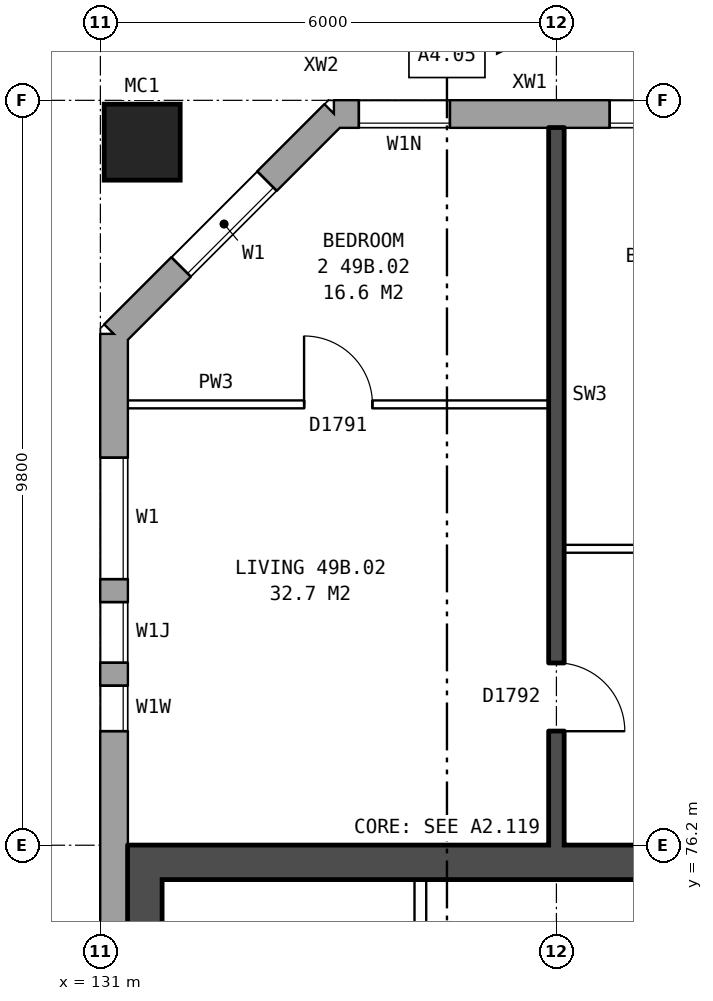
"""IFC4 building model, lengths in metres.
Left out: names, types, materials, properties, quantities, classifications, styles, units other than length and angle.
Written with IfcOpenShell. Run it as: python <this file> out.ifc"""

import sys

from ifc_helpers import new_model, si_unit, direction, frame, frame_2d, origin, origin_2d, place, context, subcontext, project, spatial, rectangle, hollow_rectangle, extrude, element, fill, save


model = new_model("IFC4")
c1 = context("Model", 3, precision=1e-05, world=origin(), true_north=direction((0.0, 1.0)))
c2 = subcontext(c1, "Body", "Model", "MODEL_VIEW")
j1 = project(units=[si_unit("LENGTHUNIT", "METRE"), si_unit("PLANEANGLEUNIT", "RADIAN")], contexts=[c1])
p1 = place(None, origin())
s1 = spatial("IfcSite", under=j1, at=p1, CompositionType="ELEMENT")
p2 = place(p1, origin())
s2 = spatial("IfcBuilding", under=s1, at=p2, CompositionType="ELEMENT")
p3 = place(p2, frame((0.0, 0.0, 175.8)))
s3 = spatial("IfcBuildingStorey", under=s2, at=p3, CompositionType="ELEMENT", Elevation=175.8)
p4 = place(p3, frame((131.55, 85.45, 0.0), z_axis=(0.0, 0.0, 1.0), x_axis=(1.0, 0.0, 0.0)))
e1 = element("IfcColumn", 1, at=p4, inside=s3, PredefinedType="COLUMN", context=c2, shape_type="SweptSolid", body=[
    extrude(hollow_rectangle(XDim=1.0, YDim=1.0, WallThickness=0.055, at=origin_2d()), origin(), (0.0, 0.0, 1.0), 3.1),
])
p5 = place(p3, frame((167.175, 85.82, 0.0), z_axis=(0.0, 0.0, 1.0), x_axis=(-1.0, 0.0, 0.0)))
e2 = element("IfcWall", 2, at=p5, inside=s3, PredefinedType="STANDARD", context=c2, shape_type="SweptSolid", body=[
    extrude(rectangle(XDim=33.101, YDim=0.36, at=frame_2d((16.55, 0.0))), origin(), (0.0, 0.0, 1.0), 2.85),
])
p6 = place(p5, frame((0.3, 0.0, 0.8)))
e3 = element("IfcOpeningElement", 3, at=p6, cuts=e2, PredefinedType="OPENING", context=c2, shape_type="SweptSolid", body=[
    extrude(rectangle(XDim=0.6, YDim=1.8, at=frame_2d((0.3, 0.9))), frame((0.0, 0.19, 0.0), z_axis=(0.0, -1.0, 0.0), x_axis=(1.0, 0.0, 0.0)), (0.0, 0.0, 1.0), 0.38),
])
p7 = place(p5, frame((3.875, 0.0, 0.8)))
e4 = element("IfcOpeningElement", 4, at=p7, cuts=e2, PredefinedType="OPENING", context=c2, shape_type="SweptSolid", body=[
    extrude(rectangle(XDim=1.6, YDim=1.8, at=frame_2d((0.8, 0.9))), frame((0.0, 0.19, 0.0), z_axis=(0.0, -1.0, 0.0), x_axis=(1.0, 0.0, 0.0)), (0.0, 0.0, 1.0), 0.38),
])
p8 = place(p5, frame((6.875, 0.0, 0.8)))
e5 = element("IfcOpeningElement", 5, at=p8, cuts=e2, PredefinedType="OPENING", context=c2, shape_type="SweptSolid", body=[
    extrude(rectangle(XDim=1.6, YDim=1.8, at=frame_2d((0.8, 0.9))), frame((0.0, 0.19, 0.0), z_axis=(0.0, -1.0, 0.0), x_axis=(1.0, 0.0, 0.0)), (0.0, 0.0, 1.0), 0.38),
])
p9 = place(p5, frame((9.875, 0.0, 0.8)))
e6 = element("IfcOpeningElement", 6, at=p9, cuts=e2, PredefinedType="OPENING", context=c2, shape_type="SweptSolid", body=[
    extrude(rectangle(XDim=1.6, YDim=1.8, at=frame_2d((0.8, 0.9))), frame((0.0, 0.19, 0.0), z_axis=(0.0, -1.0, 0.0), x_axis=(1.0, 0.0, 0.0)), (0.0, 0.0, 1.0), 0.38),
])
p10 = place(p5, frame((12.875, 0.0, 0.8)))
e7 = element("IfcOpeningElement", 7, at=p10, cuts=e2, PredefinedType="OPENING", context=c2, shape_type="SweptSolid", body=[
    extrude(rectangle(XDim=1.6, YDim=1.8, at=frame_2d((0.8, 0.9))), frame((0.0, 0.19, 0.0), z_axis=(0.0, -1.0, 0.0), x_axis=(1.0, 0.0, 0.0)), (0.0, 0.0, 1.0), 0.38),
])
p11 = place(p5, frame((15.875, 0.0, 0.8)))
e8 = element("IfcOpeningElement", 8, at=p11, cuts=e2, PredefinedType="OPENING", context=c2, shape_type="SweptSolid", body=[
    extrude(rectangle(XDim=1.6, YDim=1.8, at=frame_2d((0.8, 0.9))), frame((0.0, 0.19, 0.0), z_axis=(0.0, -1.0, 0.0), x_axis=(1.0, 0.0, 0.0)), (0.0, 0.0, 1.0), 0.38),
])
p12 = place(p5, frame((18.875, 0.0, 0.8)))
e9 = element("IfcOpeningElement", 9, at=p12, cuts=e2, PredefinedType="OPENING", context=c2, shape_type="SweptSolid", body=[
    extrude(rectangle(XDim=1.6, YDim=1.8, at=frame_2d((0.8, 0.9))), frame((0.0, 0.19, 0.0), z_axis=(0.0, -1.0, 0.0), x_axis=(1.0, 0.0, 0.0)), (0.0, 0.0, 1.0), 0.38),
])
p13 = place(p5, frame((21.875, 0.0, 0.8)))
e10 = element("IfcOpeningElement", 10, at=p13, cuts=e2, PredefinedType="OPENING", context=c2, shape_type="SweptSolid", body=[
    extrude(rectangle(XDim=1.6, YDim=1.8, at=frame_2d((0.8, 0.9))), frame((0.0, 0.19, 0.0), z_axis=(0.0, -1.0, 0.0), x_axis=(1.0, 0.0, 0.0)), (0.0, 0.0, 1.0), 0.38),
])
p14 = place(p5, frame((24.875, 0.0, 0.8)))
e11 = element("IfcOpeningElement", 11, at=p14, cuts=e2, PredefinedType="OPENING", context=c2, shape_type="SweptSolid", body=[
    extrude(rectangle(XDim=1.6, YDim=1.8, at=frame_2d((0.8, 0.9))), frame((0.0, 0.19, 0.0), z_axis=(0.0, -1.0, 0.0), x_axis=(1.0, 0.0, 0.0)), (0.0, 0.0, 1.0), 0.38),
])
p15 = place(p5, frame((27.875, 0.0, 0.8)))
e12 = element("IfcOpeningElement", 12, at=p15, cuts=e2, PredefinedType="OPENING", context=c2, shape_type="SweptSolid", body=[
    extrude(rectangle(XDim=1.6, YDim=1.8, at=frame_2d((0.8, 0.9))), frame((0.0, 0.19, 0.0), z_axis=(0.0, -1.0, 0.0), x_axis=(1.0, 0.0, 0.0)), (0.0, 0.0, 1.0), 0.38),
])
p16 = place(p5, frame((31.575, 0.0, 1.4)))
e13 = element("IfcOpeningElement", 13, at=p16, cuts=e2, PredefinedType="OPENING", context=c2, shape_type="SweptSolid", body=[
    extrude(rectangle(XDim=1.2, YDim=1.2, at=frame_2d((0.6, 0.6))), frame((0.0, 0.19, 0.0), z_axis=(0.0, -1.0, 0.0), x_axis=(1.0, 0.0, 0.0)), (0.0, 0.0, 1.0), 0.38),
])
p17 = place(p5, frame((1.2, 0.0, 1.7)))
e14 = element("IfcOpeningElement", 14, at=p17, cuts=e2, PredefinedType="OPENING", context=c2, shape_type="SweptSolid", body=[
    extrude(rectangle(XDim=0.6, YDim=0.9, at=frame_2d((0.3, 0.45))), frame((0.0, 0.19, 0.0), z_axis=(0.0, -1.0, 0.0), x_axis=(1.0, 0.0, 0.0)), (0.0, 0.0, 1.0), 0.38),
])
p18 = place(p5, frame((2.8, 0.0, 0.8)))
e15 = element("IfcOpeningElement", 15, at=p18, cuts=e2, PredefinedType="OPENING", context=c2, shape_type="SweptSolid", body=[
    extrude(rectangle(XDim=0.6, YDim=0.9, at=frame_2d((0.3, 0.45))), frame((0.0, 0.19, 0.0), z_axis=(0.0, -1.0, 0.0), x_axis=(1.0, 0.0, 0.0)), (0.0, 0.0, 1.0), 0.38),
])
p19 = place(p3, frame((134.075, 85.82, 0.0), z_axis=(0.0, 0.0, 1.0), x_axis=(-0.707106781187, -0.707106781187, 0.0)))
e16 = element("IfcWall", 16, at=p19, inside=s3, PredefinedType="STANDARD", context=c2, shape_type="SweptSolid", body=[
    extrude(rectangle(XDim=4.094, YDim=0.36, at=frame_2d((2.047, 0.0))), origin(), (0.0, 0.0, 1.0), 2.85),
])
p20 = place(p19, frame((1.247, 0.0, 0.8)))
e17 = element("IfcOpeningElement", 17, at=p20, cuts=e16, PredefinedType="OPENING", context=c2, shape_type="SweptSolid", body=[
    extrude(rectangle(XDim=1.6, YDim=1.8, at=frame_2d((0.8, 0.9))), frame((0.0, 0.19, 0.0), z_axis=(0.0, -1.0, 0.0), x_axis=(1.0, 0.0, 0.0)), (0.0, 0.0, 1.0), 0.38),
])
p21 = place(p3, frame((131.18, 82.925, 0.0), z_axis=(0.0, 0.0, 1.0), x_axis=(0.0, -1.0, 0.0)))
e18 = element("IfcWall", 18, at=p21, inside=s3, PredefinedType="STANDARD", context=c2, shape_type="SweptSolid", body=[
    extrude(rectangle(XDim=25.851, YDim=0.36, at=frame_2d((12.925, 0.0))), origin(), (0.0, 0.0, 1.0), 2.85),
])
p22 = place(p21, frame((1.625, 0.0, 0.8)))
e19 = element("IfcOpeningElement", 19, at=p22, cuts=e18, PredefinedType="OPENING", context=c2, shape_type="SweptSolid", body=[
    extrude(rectangle(XDim=1.6, YDim=1.8, at=frame_2d((0.8, 0.9))), frame((0.0, 0.19, 0.0), z_axis=(0.0, -1.0, 0.0), x_axis=(1.0, 0.0, 0.0)), (0.0, 0.0, 1.0), 0.38),
])
p23 = place(p21, frame((3.525, 0.0, 1.1)))
e20 = element("IfcOpeningElement", 20, at=p23, cuts=e18, PredefinedType="OPENING", context=c2, shape_type="SweptSolid", body=[
    extrude(rectangle(XDim=0.8, YDim=1.5, at=frame_2d((0.4, 0.75))), frame((0.0, 0.19, 0.0), z_axis=(0.0, -1.0, 0.0), x_axis=(1.0, 0.0, 0.0)), (0.0, 0.0, 1.0), 0.38),
])
p24 = place(p21, frame((19.45, 0.0, 0.35)))
e21 = element("IfcOpeningElement", 21, at=p24, cuts=e18, PredefinedType="OPENING", context=c2, shape_type="SweptSolid", body=[
    extrude(rectangle(XDim=0.8, YDim=0.9, at=frame_2d((0.4, 0.45))), frame((0.0, 0.19, 0.0), z_axis=(0.0, -1.0, 0.0), x_axis=(1.0, 0.0, 0.0)), (0.0, 0.0, 1.0), 0.38),
])
p25 = place(p21, frame((22.625, 0.0, 0.8)))
e22 = element("IfcOpeningElement", 22, at=p25, cuts=e18, PredefinedType="OPENING", context=c2, shape_type="SweptSolid", body=[
    extrude(rectangle(XDim=1.6, YDim=1.8, at=frame_2d((0.8, 0.9))), frame((0.0, 0.19, 0.0), z_axis=(0.0, -1.0, 0.0), x_axis=(1.0, 0.0, 0.0)), (0.0, 0.0, 1.0), 0.38),
])
p26 = place(p21, frame((4.625, 0.0, 1.7)))
e23 = element("IfcOpeningElement", 23, at=p26, cuts=e18, PredefinedType="OPENING", context=c2, shape_type="SweptSolid", body=[
    extrude(rectangle(XDim=0.6, YDim=0.9, at=frame_2d((0.3, 0.45))), frame((0.0, 0.19, 0.0), z_axis=(0.0, -1.0, 0.0), x_axis=(1.0, 0.0, 0.0)), (0.0, 0.0, 1.0), 0.38),
])
p27 = place(p21, frame((20.6, 0.0, 1.65)))
e24 = element("IfcOpeningElement", 24, at=p27, cuts=e18, PredefinedType="OPENING", context=c2, shape_type="SweptSolid", body=[
    extrude(rectangle(XDim=1.0, YDim=0.9, at=frame_2d((0.5, 0.45))), frame((0.0, 0.19, 0.0), z_axis=(0.0, -1.0, 0.0), x_axis=(1.0, 0.0, 0.0)), (0.0, 0.0, 1.0), 0.38),
])
p28 = place(p3, frame((131.585, 63.8, 0.0), z_axis=(0.0, 0.0, 1.0), x_axis=(0.0, 1.0, 0.0)))
e25 = element("IfcWall", 25, at=p28, inside=s3, PredefinedType="SHEAR", context=c2, shape_type="SweptSolid", body=[
    extrude(rectangle(XDim=12.4, YDim=0.45, at=frame_2d((6.2, 0.0))), origin(), (0.0, 0.0, 1.0), 2.85),
])
p29 = place(p3, frame((139.31, 75.975, 0.0), z_axis=(0.0, 0.0, 1.0), x_axis=(-1.0, 0.0, 0.0)))
e26 = element("IfcWall", 26, at=p29, inside=s3, PredefinedType="SHEAR", context=c2, shape_type="SweptSolid", body=[
    extrude(rectangle(XDim=7.5, YDim=0.45, at=frame_2d((3.75, 0.0))), origin(), (0.0, 0.0, 1.0), 2.85),
])
p30 = place(p3, frame((135.21, 71.375, 0.0), z_axis=(0.0, 0.0, 1.0), x_axis=(0.0, 1.0, 0.0)))
e27 = element("IfcWall", 27, at=p30, inside=s3, PredefinedType="PARTITIONING", context=c2, shape_type="SweptSolid", body=[
    extrude(rectangle(XDim=4.375, YDim=0.15, at=frame_2d((2.188, 0.0))), origin(), (0.0, 0.0, 1.0), 2.85),
])
p31 = place(p30, frame((2.675, 0.0, 0.0)))
e28 = element("IfcOpeningElement", 28, at=p31, cuts=e27, PredefinedType="OPENING", context=c2, shape_type="SweptSolid", body=[
    extrude(rectangle(XDim=1.1, YDim=2.1, at=frame_2d((0.55, 1.05))), frame((0.0, 0.085, 0.0), z_axis=(0.0, -1.0, 0.0), x_axis=(1.0, 0.0, 0.0)), (0.0, 0.0, 1.0), 0.17),
])
p32 = place(p3, frame((137.1, 80.1, 0.0), z_axis=(0.0, 0.0, 1.0), x_axis=(1.0, 0.0, 0.0)))
e29 = element("IfcWall", 29, at=p32, inside=s3, PredefinedType="PARTITIONING", context=c2, shape_type="SweptSolid", body=[
    extrude(rectangle(XDim=5.8, YDim=0.1, at=frame_2d((2.9, 0.0))), origin(), (0.0, 0.0, 1.0), 2.85),
])
p33 = place(p32, frame((1.3, 0.0, 0.0)))
e30 = element("IfcOpeningElement", 30, at=p33, cuts=e29, PredefinedType="OPENING", context=c2, shape_type="SweptSolid", body=[
    extrude(rectangle(XDim=0.9, YDim=2.1, at=frame_2d((0.45, 1.05))), frame((0.0, 0.06, 0.0), z_axis=(0.0, -1.0, 0.0), x_axis=(1.0, 0.0, 0.0)), (0.0, 0.0, 1.0), 0.12),
])
p34 = place(p32, frame((4.2, 0.0, 0.0)))
e31 = element("IfcOpeningElement", 31, at=p34, cuts=e29, PredefinedType="OPENING", context=c2, shape_type="SweptSolid", body=[
    extrude(rectangle(XDim=0.9, YDim=2.1, at=frame_2d((0.45, 1.05))), frame((0.0, 0.06, 0.0), z_axis=(0.0, -1.0, 0.0), x_axis=(1.0, 0.0, 0.0)), (0.0, 0.0, 1.0), 0.12),
])
p35 = place(p3, frame((131.36, 82.0, 0.0), z_axis=(0.0, 0.0, 1.0), x_axis=(1.0, 0.0, 0.0)))
e32 = element("IfcWall", 32, at=p35, inside=s3, PredefinedType="PARTITIONING", context=c2, shape_type="SweptSolid", body=[
    extrude(rectangle(XDim=5.54, YDim=0.1, at=frame_2d((2.77, 0.0))), origin(), (0.0, 0.0, 1.0), 2.85),
])
p36 = place(p35, frame((2.32, 0.0, 0.0)))
e33 = element("IfcOpeningElement", 33, at=p36, cuts=e32, PredefinedType="OPENING", context=c2, shape_type="SweptSolid", body=[
    extrude(rectangle(XDim=0.9, YDim=2.1, at=frame_2d((0.45, 1.05))), frame((0.0, 0.06, 0.0), z_axis=(0.0, -1.0, 0.0), x_axis=(1.0, 0.0, 0.0)), (0.0, 0.0, 1.0), 0.12),
])
p37 = place(p3, frame((137.0, 76.2, 0.0), z_axis=(0.0, 0.0, 1.0), x_axis=(0.0, 1.0, 0.0)))
e34 = element("IfcWall", 34, at=p37, inside=s3, PredefinedType="SOLIDWALL", context=c2, shape_type="SweptSolid", body=[
    extrude(rectangle(XDim=9.44, YDim=0.2, at=frame_2d((4.72, 0.0))), origin(), (0.0, 0.0, 1.0), 2.85),
])
p38 = place(p37, frame((1.5, 0.0, 0.0)))
e35 = element("IfcOpeningElement", 35, at=p38, cuts=e34, PredefinedType="OPENING", context=c2, shape_type="SweptSolid", body=[
    extrude(rectangle(XDim=0.9, YDim=2.1, at=frame_2d((0.45, 1.05))), frame((0.0, 0.11, 0.0), z_axis=(0.0, -1.0, 0.0), x_axis=(1.0, 0.0, 0.0)), (0.0, 0.0, 1.0), 0.22),
])
p39 = place(p15, origin())
e36 = element("IfcWindow", 36, at=p39, inside=s3, PartitioningType="SINGLE_PANEL", PredefinedType="WINDOW", context=c2, shape_type="SweptSolid", body=[
    extrude(rectangle(XDim=1.6, YDim=1.8, at=frame_2d((0.8, 0.9))), frame((0.0, 0.15, 0.0), z_axis=(0.0, -1.0, 0.0), x_axis=(1.0, 0.0, 0.0)), (0.0, 0.0, 1.0), 0.06),
])
fill(e12, e36)
p40 = place(p16, origin())
e37 = element("IfcWindow", 37, at=p40, inside=s3, PartitioningType="SINGLE_PANEL", PredefinedType="WINDOW", context=c2, shape_type="SweptSolid", body=[
    extrude(rectangle(XDim=1.2, YDim=1.2, at=frame_2d((0.6, 0.6))), frame((0.0, 0.15, 0.0), z_axis=(0.0, -1.0, 0.0), x_axis=(1.0, 0.0, 0.0)), (0.0, 0.0, 1.0), 0.06),
])
fill(e13, e37)
p41 = place(p20, origin())
e38 = element("IfcWindow", 38, at=p41, inside=s3, PartitioningType="SINGLE_PANEL", PredefinedType="WINDOW", context=c2, shape_type="SweptSolid", body=[
    extrude(rectangle(XDim=1.6, YDim=1.8, at=frame_2d((0.8, 0.9))), frame((0.0, 0.15, 0.0), z_axis=(0.0, -1.0, 0.0), x_axis=(1.0, 0.0, 0.0)), (0.0, 0.0, 1.0), 0.06),
])
fill(e17, e38)
p42 = place(p22, origin())
e39 = element("IfcWindow", 39, at=p42, inside=s3, PartitioningType="SINGLE_PANEL", PredefinedType="WINDOW", context=c2, shape_type="SweptSolid", body=[
    extrude(rectangle(XDim=1.6, YDim=1.8, at=frame_2d((0.8, 0.9))), frame((0.0, 0.15, 0.0), z_axis=(0.0, -1.0, 0.0), x_axis=(1.0, 0.0, 0.0)), (0.0, 0.0, 1.0), 0.06),
])
fill(e19, e39)
p43 = place(p23, origin())
e40 = element("IfcWindow", 40, at=p43, inside=s3, PartitioningType="SINGLE_PANEL", PredefinedType="WINDOW", context=c2, shape_type="SweptSolid", body=[
    extrude(rectangle(XDim=0.8, YDim=1.5, at=frame_2d((0.4, 0.75))), frame((0.0, 0.15, 0.0), z_axis=(0.0, -1.0, 0.0), x_axis=(1.0, 0.0, 0.0)), (0.0, 0.0, 1.0), 0.06),
])
fill(e20, e40)
p44 = place(p36, origin())
e41 = element("IfcDoor", 41, at=p44, inside=s3, OperationType="SINGLE_SWING_LEFT", PredefinedType="DOOR", context=c2, shape_type="SweptSolid", body=[
    extrude(rectangle(XDim=0.9, YDim=2.1, at=frame_2d((0.45, 1.05))), frame((0.0, 0.025, 0.0), z_axis=(0.0, -1.0, 0.0), x_axis=(1.0, 0.0, 0.0)), (0.0, 0.0, 1.0), 0.05),
])
fill(e33, e41)
p45 = place(p38, frame((0.9, 0.0, 0.0), z_axis=(0.0, 0.0, 1.0), x_axis=(-1.0, 0.0, 0.0)))
e42 = element("IfcDoor", 42, at=p45, inside=s3, OperationType="SINGLE_SWING_RIGHT", PredefinedType="DOOR", context=c2, shape_type="SweptSolid", body=[
    extrude(rectangle(XDim=0.9, YDim=2.1, at=frame_2d((0.45, 1.05))), frame((0.0, 0.025, 0.0), z_axis=(0.0, -1.0, 0.0), x_axis=(1.0, 0.0, 0.0)), (0.0, 0.0, 1.0), 0.05),
])
fill(e35, e42)
p46 = place(p26, origin())
e43 = element("IfcWindow", 43, at=p46, inside=s3, PartitioningType="SINGLE_PANEL", PredefinedType="WINDOW", context=c2, shape_type="SweptSolid", body=[
    extrude(rectangle(XDim=0.6, YDim=0.9, at=frame_2d((0.3, 0.45))), frame((0.0, 0.15, 0.0), z_axis=(0.0, -1.0, 0.0), x_axis=(1.0, 0.0, 0.0)), (0.0, 0.0, 1.0), 0.06),
])
fill(e23, e43)
save(model, sys.argv[1])
